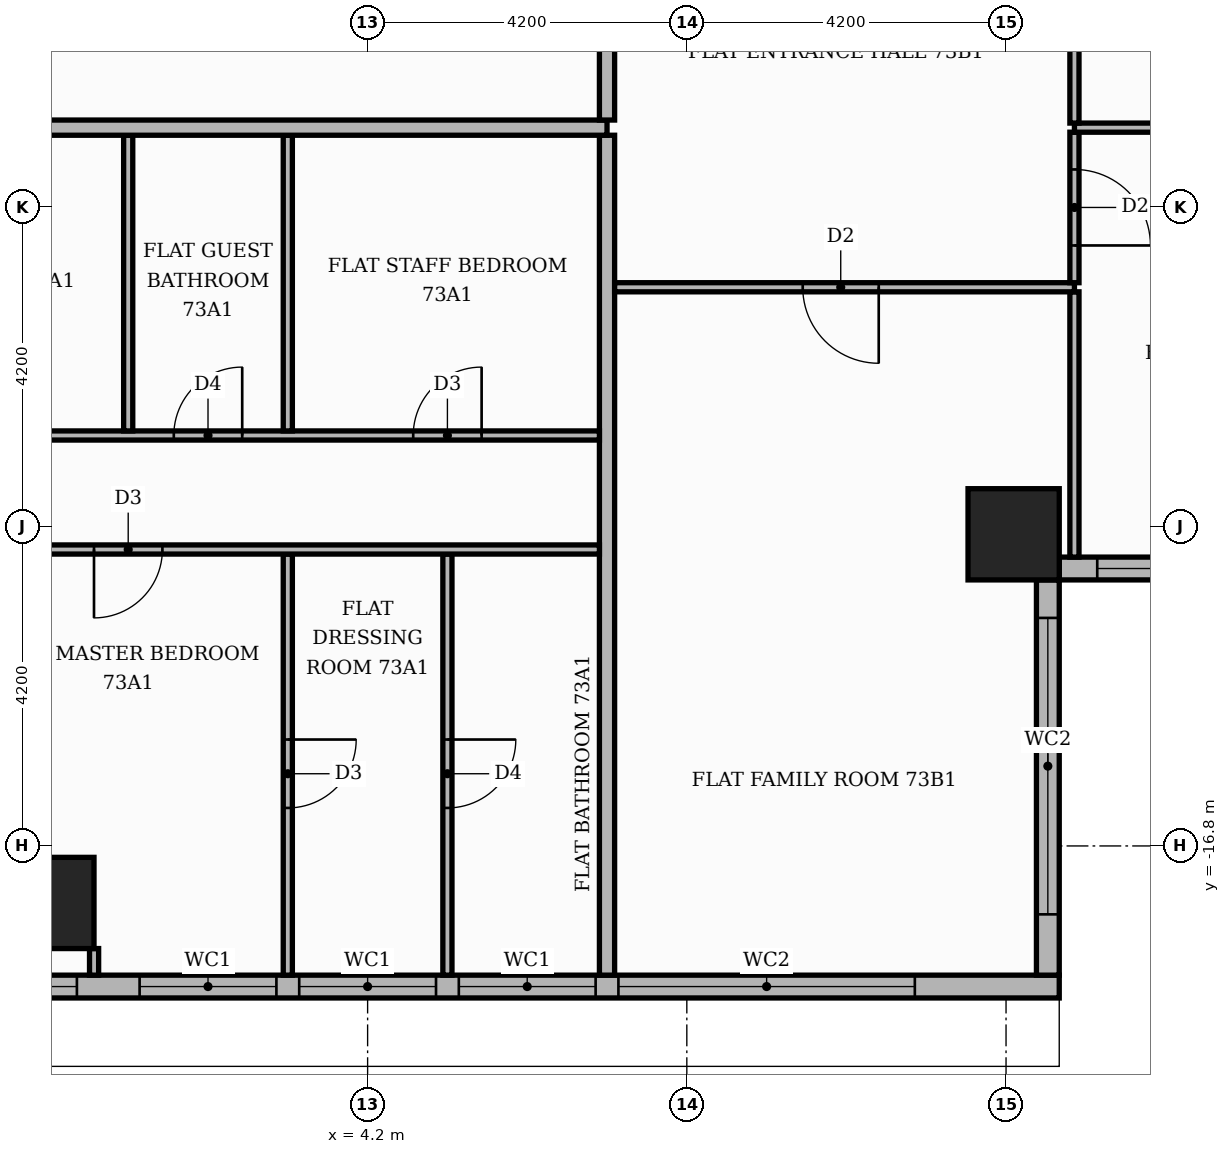
"""IFC4 building model, lengths in metres.
Left out: names, types, materials, properties, quantities, classifications, styles, units other than length and angle.
Written with IfcOpenShell. Run it as: python <this file> out.ifc"""

import sys

from ifc_helpers import new_model, si_unit, direction, frame, frame_2d, origin, origin_2d, place, context, subcontext, project, spatial, rectangle, extrude, element, fill, save


model = new_model("IFC4")
c1 = context("Model", 3, precision=1e-05, world=origin(), true_north=direction((0.0, 1.0)))
c2 = subcontext(c1, "Body", "Model", "MODEL_VIEW")
j1 = project(units=[si_unit("LENGTHUNIT", "METRE"), si_unit("PLANEANGLEUNIT", "RADIAN")], contexts=[c1])
p1 = place(None, origin())
s1 = spatial("IfcSite", under=j1, at=p1, CompositionType="ELEMENT")
p2 = place(p1, origin())
s2 = spatial("IfcBuilding", under=s1, at=p2, CompositionType="ELEMENT")
p3 = place(p2, frame((0.0, 0.0, 304.5)))
s3 = spatial("IfcBuildingStorey", under=s2, at=p3, CompositionType="ELEMENT", Elevation=304.5)
for number, where, z_axis, x_axis in (
    (1, (12.7, -12.7, 0.0), (0.0, 0.0, 1.0), (1.0, 0.0, 0.0)),
    (2, (0.0, -17.55, 0.0), (0.0, 0.0, 1.0), (1.0, 0.0, 0.0)),
):
    element("IfcColumn", number, at=place(p3, frame(where, z_axis=z_axis, x_axis=x_axis)), inside=s3, PredefinedType="COLUMN", context=c2, shape_type="SweptSolid", body=[
        extrude(rectangle(XDim=1.2, YDim=1.2, at=origin_2d()), origin(), (0.0, 0.0, 1.0), 3.9),
    ])
p4 = place(p3, frame((-13.0, -18.65, 0.0), z_axis=(0.0, 0.0, 1.0), x_axis=(1.0, 0.0, 0.0)))
e3 = element("IfcWall", 3, at=p4, inside=s3, PredefinedType="STANDARD", context=c2, shape_type="SweptSolid", body=[
    extrude(rectangle(XDim=26.3, YDim=0.3, at=frame_2d((13.15, 0.0))), origin(), (0.0, 0.0, 1.0), 3.55),
])
p5 = place(p4, frame((1.6, 0.0, 0.6)))
e4 = element("IfcOpeningElement", 4, at=p5, cuts=e3, PredefinedType="OPENING", context=c2, shape_type="SweptSolid", body=[
    extrude(rectangle(XDim=3.9, YDim=2.4, at=frame_2d((1.95, 1.2))), frame((0.0, 0.16, 0.0), z_axis=(0.0, -1.0, 0.0), x_axis=(1.0, 0.0, 0.0)), (0.0, 0.0, 1.0), 0.32),
])
p6 = place(p4, frame((5.8, 0.0, 0.6)))
e5 = element("IfcOpeningElement", 5, at=p6, cuts=e3, PredefinedType="OPENING", context=c2, shape_type="SweptSolid", body=[
    extrude(rectangle(XDim=6.0, YDim=2.4, at=frame_2d((3.0, 1.2))), frame((0.0, 0.16, 0.0), z_axis=(0.0, -1.0, 0.0), x_axis=(1.0, 0.0, 0.0)), (0.0, 0.0, 1.0), 0.32),
])
p7 = place(p4, frame((14.2, 0.0, 0.6)))
e6 = element("IfcOpeningElement", 6, at=p7, cuts=e3, PredefinedType="OPENING", context=c2, shape_type="SweptSolid", body=[
    extrude(rectangle(XDim=1.8, YDim=2.4, at=frame_2d((0.9, 1.2))), frame((0.0, 0.16, 0.0), z_axis=(0.0, -1.0, 0.0), x_axis=(1.0, 0.0, 0.0)), (0.0, 0.0, 1.0), 0.32),
])
p8 = place(p4, frame((16.3, 0.0, 0.6)))
e7 = element("IfcOpeningElement", 7, at=p8, cuts=e3, PredefinedType="OPENING", context=c2, shape_type="SweptSolid", body=[
    extrude(rectangle(XDim=1.8, YDim=2.4, at=frame_2d((0.9, 1.2))), frame((0.0, 0.16, 0.0), z_axis=(0.0, -1.0, 0.0), x_axis=(1.0, 0.0, 0.0)), (0.0, 0.0, 1.0), 0.32),
])
p9 = place(p4, frame((18.4, 0.0, 0.6)))
e8 = element("IfcOpeningElement", 8, at=p9, cuts=e3, PredefinedType="OPENING", context=c2, shape_type="SweptSolid", body=[
    extrude(rectangle(XDim=1.8, YDim=2.4, at=frame_2d((0.9, 1.2))), frame((0.0, 0.16, 0.0), z_axis=(0.0, -1.0, 0.0), x_axis=(1.0, 0.0, 0.0)), (0.0, 0.0, 1.0), 0.32),
])
p10 = place(p4, frame((20.5, 0.0, 0.6)))
e9 = element("IfcOpeningElement", 9, at=p10, cuts=e3, PredefinedType="OPENING", context=c2, shape_type="SweptSolid", body=[
    extrude(rectangle(XDim=3.9, YDim=2.4, at=frame_2d((1.95, 1.2))), frame((0.0, 0.16, 0.0), z_axis=(0.0, -1.0, 0.0), x_axis=(1.0, 0.0, 0.0)), (0.0, 0.0, 1.0), 0.32),
])
p11 = place(p4, frame((12.175, 0.0, 0.9)))
e10 = element("IfcOpeningElement", 10, at=p11, cuts=e3, PredefinedType="OPENING", context=c2, shape_type="SweptSolid", body=[
    extrude(rectangle(XDim=1.2, YDim=2.1, at=frame_2d((0.6, 1.05))), frame((0.0, 0.16, 0.0), z_axis=(0.0, -1.0, 0.0), x_axis=(1.0, 0.0, 0.0)), (0.0, 0.0, 1.0), 0.32),
])
p12 = place(p3, frame((13.15, -18.5, 0.0), z_axis=(0.0, 0.0, 1.0), x_axis=(0.0, 1.0, 0.0)))
e11 = element("IfcWall", 11, at=p12, inside=s3, PredefinedType="STANDARD", context=c2, shape_type="SweptSolid", body=[
    extrude(rectangle(XDim=5.2, YDim=0.3, at=frame_2d((2.6, 0.0))), origin(), (0.0, 0.0, 1.0), 3.55),
])
p13 = place(p12, frame((0.8, 0.0, 0.6)))
e12 = element("IfcOpeningElement", 12, at=p13, cuts=e11, PredefinedType="OPENING", context=c2, shape_type="SweptSolid", body=[
    extrude(rectangle(XDim=3.9, YDim=2.4, at=frame_2d((1.95, 1.2))), frame((0.0, 0.16, 0.0), z_axis=(0.0, -1.0, 0.0), x_axis=(1.0, 0.0, 0.0)), (0.0, 0.0, 1.0), 0.32),
])
p14 = place(p3, frame((13.3, -13.15, 0.0), z_axis=(0.0, 0.0, 1.0), x_axis=(1.0, 0.0, 0.0)))
e13 = element("IfcWall", 13, at=p14, inside=s3, PredefinedType="STANDARD", context=c2, shape_type="SweptSolid", body=[
    extrude(rectangle(XDim=5.5, YDim=0.3, at=frame_2d((2.75, 0.0))), origin(), (0.0, 0.0, 1.0), 3.55),
])
p15 = place(p14, frame((0.5, 0.0, 0.6)))
e14 = element("IfcOpeningElement", 14, at=p15, cuts=e13, PredefinedType="OPENING", context=c2, shape_type="SweptSolid", body=[
    extrude(rectangle(XDim=3.9, YDim=2.4, at=frame_2d((1.95, 1.2))), frame((0.0, 0.16, 0.0), z_axis=(0.0, -1.0, 0.0), x_axis=(1.0, 0.0, 0.0)), (0.0, 0.0, 1.0), 0.32),
])
p16 = place(p3, frame((0.601, -18.5, 0.0), z_axis=(0.0, 0.0, 1.0), x_axis=(0.0, 1.0, 0.0)))
e15 = element("IfcWall", 15, at=p16, inside=s3, PredefinedType="PARTITIONING", context=c2, shape_type="SweptSolid", body=[
    extrude(rectangle(XDim=0.35, YDim=0.12, at=frame_2d((0.175, 0.0))), origin(), (0.0, 0.0, 1.0), 3.55),
])
p17 = place(p3, frame((3.15, -18.5, 0.0), z_axis=(0.0, 0.0, 1.0), x_axis=(0.0, 1.0, 0.0)))
e16 = element("IfcWall", 16, at=p17, inside=s3, PredefinedType="PARTITIONING", context=c2, shape_type="SweptSolid", body=[
    extrude(rectangle(XDim=5.54, YDim=0.12, at=frame_2d((2.77, 0.0))), origin(), (0.0, 0.0, 1.0), 3.55),
])
p18 = place(p17, frame((2.2, 0.0, 0.0)))
e17 = element("IfcOpeningElement", 17, at=p18, cuts=e16, PredefinedType="OPENING", context=c2, shape_type="SweptSolid", body=[
    extrude(rectangle(XDim=0.9, YDim=2.1, at=frame_2d((0.45, 1.05))), frame((0.0, 0.07, 0.0), z_axis=(0.0, -1.0, 0.0), x_axis=(1.0, 0.0, 0.0)), (0.0, 0.0, 1.0), 0.14),
])
p19 = place(p3, frame((5.25, -18.5, 0.0), z_axis=(0.0, 0.0, 1.0), x_axis=(0.0, 1.0, 0.0)))
e18 = element("IfcWall", 18, at=p19, inside=s3, PredefinedType="PARTITIONING", context=c2, shape_type="SweptSolid", body=[
    extrude(rectangle(XDim=5.54, YDim=0.12, at=frame_2d((2.77, 0.0))), origin(), (0.0, 0.0, 1.0), 3.55),
])
p20 = place(p19, frame((2.2, 0.0, 0.0)))
e19 = element("IfcOpeningElement", 19, at=p20, cuts=e18, PredefinedType="OPENING", context=c2, shape_type="SweptSolid", body=[
    extrude(rectangle(XDim=0.9, YDim=2.1, at=frame_2d((0.45, 1.05))), frame((0.0, 0.07, 0.0), z_axis=(0.0, -1.0, 0.0), x_axis=(1.0, 0.0, 0.0)), (0.0, 0.0, 1.0), 0.14),
])
p21 = place(p3, frame((7.35, -18.5, 0.0), z_axis=(0.0, 0.0, 1.0), x_axis=(0.0, 1.0, 0.0)))
e20 = element("IfcWall", 20, at=p21, inside=s3, PredefinedType="PARTITIONING", context=c2, shape_type="SweptSolid", body=[
    extrude(rectangle(XDim=11.05, YDim=0.2, at=frame_2d((5.525, 0.0))), origin(), (0.0, 0.0, 1.0), 3.55),
])
p22 = place(p3, frame((13.5, -13.0, 0.0), z_axis=(0.0, 0.0, 1.0), x_axis=(0.0, 1.0, 0.0)))
e21 = element("IfcWall", 21, at=p22, inside=s3, PredefinedType="PARTITIONING", context=c2, shape_type="SweptSolid", body=[
    extrude(rectangle(XDim=3.49, YDim=0.12, at=frame_2d((1.745, 0.0))), origin(), (0.0, 0.0, 1.0), 3.55),
])
p23 = place(p3, frame((-12.1, -12.9, 0.0), z_axis=(0.0, 0.0, 1.0), x_axis=(1.0, 0.0, 0.0)))
e22 = element("IfcWall", 22, at=p23, inside=s3, PredefinedType="PARTITIONING", context=c2, shape_type="SweptSolid", body=[
    extrude(rectangle(XDim=19.35, YDim=0.12, at=frame_2d((9.675, 0.0))), origin(), (0.0, 0.0, 1.0), 3.55),
])
p24 = place(p23, frame((3.2, 0.0, 0.0)))
e23 = element("IfcOpeningElement", 23, at=p24, cuts=e22, PredefinedType="OPENING", context=c2, shape_type="SweptSolid", body=[
    extrude(rectangle(XDim=1.0, YDim=2.1, at=frame_2d((0.5, 1.05))), frame((0.0, 0.07, 0.0), z_axis=(0.0, -1.0, 0.0), x_axis=(1.0, 0.0, 0.0)), (0.0, 0.0, 1.0), 0.14),
])
p25 = place(p23, frame((7.4, 0.0, 0.0)))
e24 = element("IfcOpeningElement", 24, at=p25, cuts=e22, PredefinedType="OPENING", context=c2, shape_type="SweptSolid", body=[
    extrude(rectangle(XDim=1.0, YDim=2.1, at=frame_2d((0.5, 1.05))), frame((0.0, 0.07, 0.0), z_axis=(0.0, -1.0, 0.0), x_axis=(1.0, 0.0, 0.0)), (0.0, 0.0, 1.0), 0.14),
])
p26 = place(p23, frame((12.7, 0.0, 0.0)))
e25 = element("IfcOpeningElement", 25, at=p26, cuts=e22, PredefinedType="OPENING", context=c2, shape_type="SweptSolid", body=[
    extrude(rectangle(XDim=0.9, YDim=2.1, at=frame_2d((0.45, 1.05))), frame((0.0, 0.07, 0.0), z_axis=(0.0, -1.0, 0.0), x_axis=(1.0, 0.0, 0.0)), (0.0, 0.0, 1.0), 0.14),
])
p27 = place(p3, frame((-3.15, -11.4, 0.0), z_axis=(0.0, 0.0, 1.0), x_axis=(1.0, 0.0, 0.0)))
e26 = element("IfcWall", 26, at=p27, inside=s3, PredefinedType="PARTITIONING", context=c2, shape_type="SweptSolid", body=[
    extrude(rectangle(XDim=10.4, YDim=0.12, at=frame_2d((5.2, 0.0))), origin(), (0.0, 0.0, 1.0), 3.55),
])
p28 = place(p27, frame((1.65, 0.0, 0.0)))
e27 = element("IfcOpeningElement", 27, at=p28, cuts=e26, PredefinedType="OPENING", context=c2, shape_type="SweptSolid", body=[
    extrude(rectangle(XDim=0.9, YDim=2.1, at=frame_2d((0.45, 1.05))), frame((0.0, 0.07, 0.0), z_axis=(0.0, -1.0, 0.0), x_axis=(1.0, 0.0, 0.0)), (0.0, 0.0, 1.0), 0.14),
])
p29 = place(p27, frame((4.8, 0.0, 0.0)))
e28 = element("IfcOpeningElement", 28, at=p29, cuts=e26, PredefinedType="OPENING", context=c2, shape_type="SweptSolid", body=[
    extrude(rectangle(XDim=0.9, YDim=2.1, at=frame_2d((0.45, 1.05))), frame((0.0, 0.07, 0.0), z_axis=(0.0, -1.0, 0.0), x_axis=(1.0, 0.0, 0.0)), (0.0, 0.0, 1.0), 0.14),
])
p30 = place(p27, frame((7.95, 0.0, 0.0)))
e29 = element("IfcOpeningElement", 29, at=p30, cuts=e26, PredefinedType="OPENING", context=c2, shape_type="SweptSolid", body=[
    extrude(rectangle(XDim=0.9, YDim=2.1, at=frame_2d((0.45, 1.05))), frame((0.0, 0.07, 0.0), z_axis=(0.0, -1.0, 0.0), x_axis=(1.0, 0.0, 0.0)), (0.0, 0.0, 1.0), 0.14),
])
for number, where, z_axis, x_axis in (
    (30, (1.05, -11.34, 0.0), (0.0, 0.0, 1.0), (0.0, 1.0, 0.0)),
    (31, (3.15, -11.34, 0.0), (0.0, 0.0, 1.0), (0.0, 1.0, 0.0)),
):
    element("IfcWall", number, at=place(p3, frame(where, z_axis=z_axis, x_axis=x_axis)), inside=s3, PredefinedType="PARTITIONING", context=c2, shape_type="SweptSolid", body=[
        extrude(rectangle(XDim=3.89, YDim=0.12, at=frame_2d((1.945, 0.0))), origin(), (0.0, 0.0, 1.0), 3.55),
    ])
p31 = place(p3, frame((7.45, -9.45, 0.0), z_axis=(0.0, 0.0, 1.0), x_axis=(1.0, 0.0, 0.0)))
e32 = element("IfcWall", 32, at=p31, inside=s3, PredefinedType="PARTITIONING", context=c2, shape_type="SweptSolid", body=[
    extrude(rectangle(XDim=6.05, YDim=0.12, at=frame_2d((3.025, 0.0))), origin(), (0.0, 0.0, 1.0), 3.55),
])
p32 = place(p31, frame((2.475, 0.0, 0.0)))
e33 = element("IfcOpeningElement", 33, at=p32, cuts=e32, PredefinedType="OPENING", context=c2, shape_type="SweptSolid", body=[
    extrude(rectangle(XDim=1.0, YDim=2.1, at=frame_2d((0.5, 1.05))), frame((0.0, 0.07, 0.0), z_axis=(0.0, -1.0, 0.0), x_axis=(1.0, 0.0, 0.0)), (0.0, 0.0, 1.0), 0.14),
])
p33 = place(p3, frame((13.5, -9.39, 0.0), z_axis=(0.0, 0.0, 1.0), x_axis=(0.0, 1.0, 0.0)))
e34 = element("IfcWall", 34, at=p33, inside=s3, PredefinedType="PARTITIONING", context=c2, shape_type="SweptSolid", body=[
    extrude(rectangle(XDim=1.98, YDim=0.12, at=frame_2d((0.99, 0.0))), origin(), (0.0, 0.0, 1.0), 3.55),
])
p34 = place(p33, frame((0.49, 0.0, 0.0)))
e35 = element("IfcOpeningElement", 35, at=p34, cuts=e34, PredefinedType="OPENING", context=c2, shape_type="SweptSolid", body=[
    extrude(rectangle(XDim=1.0, YDim=2.1, at=frame_2d((0.5, 1.05))), frame((0.0, 0.07, 0.0), z_axis=(0.0, -1.0, 0.0), x_axis=(1.0, 0.0, 0.0)), (0.0, 0.0, 1.0), 0.14),
])
p35 = place(p3, frame((-18.5, -7.35, 0.0), z_axis=(0.0, 0.0, 1.0), x_axis=(1.0, 0.0, 0.0)))
e36 = element("IfcWall", 36, at=p35, inside=s3, PredefinedType="PARTITIONING", context=c2, shape_type="SweptSolid", body=[
    extrude(rectangle(XDim=25.85, YDim=0.2, at=frame_2d((12.925, 0.0))), origin(), (0.0, 0.0, 1.0), 3.55),
])
p36 = place(p35, frame((12.7, 0.0, 0.0)))
e37 = element("IfcOpeningElement", 37, at=p36, cuts=e36, PredefinedType="OPENING", context=c2, shape_type="SweptSolid", body=[
    extrude(rectangle(XDim=1.1, YDim=2.4, at=frame_2d((0.55, 1.2))), frame((0.0, 0.11, 0.0), z_axis=(0.0, -1.0, 0.0), x_axis=(1.0, 0.0, 0.0)), (0.0, 0.0, 1.0), 0.22),
])
p37 = place(p3, frame((13.5, -7.35, 0.0), z_axis=(0.0, 0.0, 1.0), x_axis=(1.0, 0.0, 0.0)))
e38 = element("IfcWall", 38, at=p37, inside=s3, PredefinedType="PARTITIONING", context=c2, shape_type="SweptSolid", body=[
    extrude(rectangle(XDim=5.0, YDim=0.12, at=frame_2d((2.5, 0.0))), origin(), (0.0, 0.0, 1.0), 3.55),
])
p38 = place(p3, frame((13.5, -7.29, 0.0), z_axis=(0.0, 0.0, 1.0), x_axis=(0.0, 1.0, 0.0)))
e39 = element("IfcWall", 39, at=p38, inside=s3, PredefinedType="PARTITIONING", context=c2, shape_type="SweptSolid", body=[
    extrude(rectangle(XDim=4.08, YDim=0.12, at=frame_2d((2.04, 0.0))), origin(), (0.0, 0.0, 1.0), 3.55),
])
p39 = place(p38, frame((1.59, 0.0, 0.0)))
e40 = element("IfcOpeningElement", 40, at=p39, cuts=e39, PredefinedType="OPENING", context=c2, shape_type="SweptSolid", body=[
    extrude(rectangle(XDim=0.9, YDim=2.1, at=frame_2d((0.45, 1.05))), frame((0.0, 0.07, 0.0), z_axis=(0.0, -1.0, 0.0), x_axis=(1.0, 0.0, 0.0)), (0.0, 0.0, 1.0), 0.14),
])
p40 = place(p3, frame((7.35, -7.25, 0.0), z_axis=(0.0, 0.0, 1.0), x_axis=(0.0, 1.0, 0.0)))
e41 = element("IfcWall", 41, at=p40, inside=s3, PredefinedType="PARTITIONING", context=c2, shape_type="SweptSolid", body=[
    extrude(rectangle(XDim=14.5, YDim=0.2, at=frame_2d((7.25, 0.0))), origin(), (0.0, 0.0, 1.0), 3.55),
])
p41 = place(p40, frame((1.45, 0.0, 0.0)))
e42 = element("IfcOpeningElement", 42, at=p41, cuts=e41, PredefinedType="OPENING", context=c2, shape_type="SweptSolid", body=[
    extrude(rectangle(XDim=1.1, YDim=2.4, at=frame_2d((0.55, 1.2))), frame((0.0, 0.11, 0.0), z_axis=(0.0, -1.0, 0.0), x_axis=(1.0, 0.0, 0.0)), (0.0, 0.0, 1.0), 0.22),
])
p42 = place(p7, origin())
e43 = element("IfcWindow", 43, at=p42, inside=s3, PartitioningType="SINGLE_PANEL", PredefinedType="WINDOW", context=c2, shape_type="SweptSolid", body=[
    extrude(rectangle(XDim=1.8, YDim=2.4, at=frame_2d((0.9, 1.2))), frame((0.0, 0.03, 0.0), z_axis=(0.0, -1.0, 0.0), x_axis=(1.0, 0.0, 0.0)), (0.0, 0.0, 1.0), 0.06),
])
fill(e6, e43)
p43 = place(p8, origin())
e44 = element("IfcWindow", 44, at=p43, inside=s3, PartitioningType="SINGLE_PANEL", PredefinedType="WINDOW", context=c2, shape_type="SweptSolid", body=[
    extrude(rectangle(XDim=1.8, YDim=2.4, at=frame_2d((0.9, 1.2))), frame((0.0, 0.03, 0.0), z_axis=(0.0, -1.0, 0.0), x_axis=(1.0, 0.0, 0.0)), (0.0, 0.0, 1.0), 0.06),
])
fill(e7, e44)
p44 = place(p9, origin())
e45 = element("IfcWindow", 45, at=p44, inside=s3, PartitioningType="SINGLE_PANEL", PredefinedType="WINDOW", context=c2, shape_type="SweptSolid", body=[
    extrude(rectangle(XDim=1.8, YDim=2.4, at=frame_2d((0.9, 1.2))), frame((0.0, 0.03, 0.0), z_axis=(0.0, -1.0, 0.0), x_axis=(1.0, 0.0, 0.0)), (0.0, 0.0, 1.0), 0.06),
])
fill(e8, e45)
p45 = place(p10, origin())
e46 = element("IfcWindow", 46, at=p45, inside=s3, PartitioningType="SINGLE_PANEL", PredefinedType="WINDOW", context=c2, shape_type="SweptSolid", body=[
    extrude(rectangle(XDim=3.9, YDim=2.4, at=frame_2d((1.95, 1.2))), frame((0.0, 0.03, 0.0), z_axis=(0.0, -1.0, 0.0), x_axis=(1.0, 0.0, 0.0)), (0.0, 0.0, 1.0), 0.06),
])
fill(e9, e46)
p46 = place(p11, origin())
e47 = element("IfcWindow", 47, at=p46, inside=s3, PartitioningType="SINGLE_PANEL", PredefinedType="WINDOW", context=c2, shape_type="SweptSolid", body=[
    extrude(rectangle(XDim=1.2, YDim=2.1, at=frame_2d((0.6, 1.05))), frame((0.0, 0.03, 0.0), z_axis=(0.0, -1.0, 0.0), x_axis=(1.0, 0.0, 0.0)), (0.0, 0.0, 1.0), 0.06),
])
fill(e10, e47)
p47 = place(p13, origin())
e48 = element("IfcWindow", 48, at=p47, inside=s3, PartitioningType="SINGLE_PANEL", PredefinedType="WINDOW", context=c2, shape_type="SweptSolid", body=[
    extrude(rectangle(XDim=3.9, YDim=2.4, at=frame_2d((1.95, 1.2))), frame((0.0, 0.03, 0.0), z_axis=(0.0, -1.0, 0.0), x_axis=(1.0, 0.0, 0.0)), (0.0, 0.0, 1.0), 0.06),
])
fill(e12, e48)
p48 = place(p15, origin())
e49 = element("IfcWindow", 49, at=p48, inside=s3, PartitioningType="SINGLE_PANEL", PredefinedType="WINDOW", context=c2, shape_type="SweptSolid", body=[
    extrude(rectangle(XDim=3.9, YDim=2.4, at=frame_2d((1.95, 1.2))), frame((0.0, 0.03, 0.0), z_axis=(0.0, -1.0, 0.0), x_axis=(1.0, 0.0, 0.0)), (0.0, 0.0, 1.0), 0.06),
])
fill(e14, e49)
p49 = place(p29, origin())
e50 = element("IfcDoor", 50, at=p49, inside=s3, OperationType="SINGLE_SWING_RIGHT", PredefinedType="DOOR", context=c2, shape_type="SweptSolid", body=[
    extrude(rectangle(XDim=0.9, YDim=2.1, at=frame_2d((0.45, 1.05))), frame((0.0, 0.025, 0.0), z_axis=(0.0, -1.0, 0.0), x_axis=(1.0, 0.0, 0.0)), (0.0, 0.0, 1.0), 0.05),
])
fill(e28, e50)
p50 = place(p30, origin())
e51 = element("IfcDoor", 51, at=p50, inside=s3, OperationType="SINGLE_SWING_RIGHT", PredefinedType="DOOR", context=c2, shape_type="SweptSolid", body=[
    extrude(rectangle(XDim=0.9, YDim=2.1, at=frame_2d((0.45, 1.05))), frame((0.0, 0.025, 0.0), z_axis=(0.0, -1.0, 0.0), x_axis=(1.0, 0.0, 0.0)), (0.0, 0.0, 1.0), 0.05),
])
fill(e29, e51)
p51 = place(p26, frame((0.9, 0.0, 0.0), z_axis=(0.0, 0.0, 1.0), x_axis=(-1.0, 0.0, 0.0)))
e52 = element("IfcDoor", 52, at=p51, inside=s3, OperationType="SINGLE_SWING_LEFT", PredefinedType="DOOR", context=c2, shape_type="SweptSolid", body=[
    extrude(rectangle(XDim=0.9, YDim=2.1, at=frame_2d((0.45, 1.05))), frame((0.0, 0.025, 0.0), z_axis=(0.0, -1.0, 0.0), x_axis=(1.0, 0.0, 0.0)), (0.0, 0.0, 1.0), 0.05),
])
fill(e25, e52)
p52 = place(p18, frame((0.9, 0.0, 0.0), z_axis=(0.0, 0.0, 1.0), x_axis=(-1.0, 0.0, 0.0)))
e53 = element("IfcDoor", 53, at=p52, inside=s3, OperationType="SINGLE_SWING_RIGHT", PredefinedType="DOOR", context=c2, shape_type="SweptSolid", body=[
    extrude(rectangle(XDim=0.9, YDim=2.1, at=frame_2d((0.45, 1.05))), frame((0.0, 0.025, 0.0), z_axis=(0.0, -1.0, 0.0), x_axis=(1.0, 0.0, 0.0)), (0.0, 0.0, 1.0), 0.05),
])
fill(e17, e53)
p53 = place(p20, frame((0.9, 0.0, 0.0), z_axis=(0.0, 0.0, 1.0), x_axis=(-1.0, 0.0, 0.0)))
e54 = element("IfcDoor", 54, at=p53, inside=s3, OperationType="SINGLE_SWING_RIGHT", PredefinedType="DOOR", context=c2, shape_type="SweptSolid", body=[
    extrude(rectangle(XDim=0.9, YDim=2.1, at=frame_2d((0.45, 1.05))), frame((0.0, 0.025, 0.0), z_axis=(0.0, -1.0, 0.0), x_axis=(1.0, 0.0, 0.0)), (0.0, 0.0, 1.0), 0.05),
])
fill(e19, e54)
p54 = place(p32, frame((1.0, 0.0, 0.0), z_axis=(0.0, 0.0, 1.0), x_axis=(-1.0, 0.0, 0.0)))
e55 = element("IfcDoor", 55, at=p54, inside=s3, OperationType="SINGLE_SWING_RIGHT", PredefinedType="DOOR", context=c2, shape_type="SweptSolid", body=[
    extrude(rectangle(XDim=1.0, YDim=2.1, at=frame_2d((0.5, 1.05))), frame((0.0, 0.025, 0.0), z_axis=(0.0, -1.0, 0.0), x_axis=(1.0, 0.0, 0.0)), (0.0, 0.0, 1.0), 0.05),
])
fill(e33, e55)
p55 = place(p34, frame((1.0, 0.0, 0.0), z_axis=(0.0, 0.0, 1.0), x_axis=(-1.0, 0.0, 0.0)))
e56 = element("IfcDoor", 56, at=p55, inside=s3, OperationType="SINGLE_SWING_LEFT", PredefinedType="DOOR", context=c2, shape_type="SweptSolid", body=[
    extrude(rectangle(XDim=1.0, YDim=2.1, at=frame_2d((0.5, 1.05))), frame((0.0, 0.025, 0.0), z_axis=(0.0, -1.0, 0.0), x_axis=(1.0, 0.0, 0.0)), (0.0, 0.0, 1.0), 0.05),
])
fill(e35, e56)
save(model, sys.argv[1])
